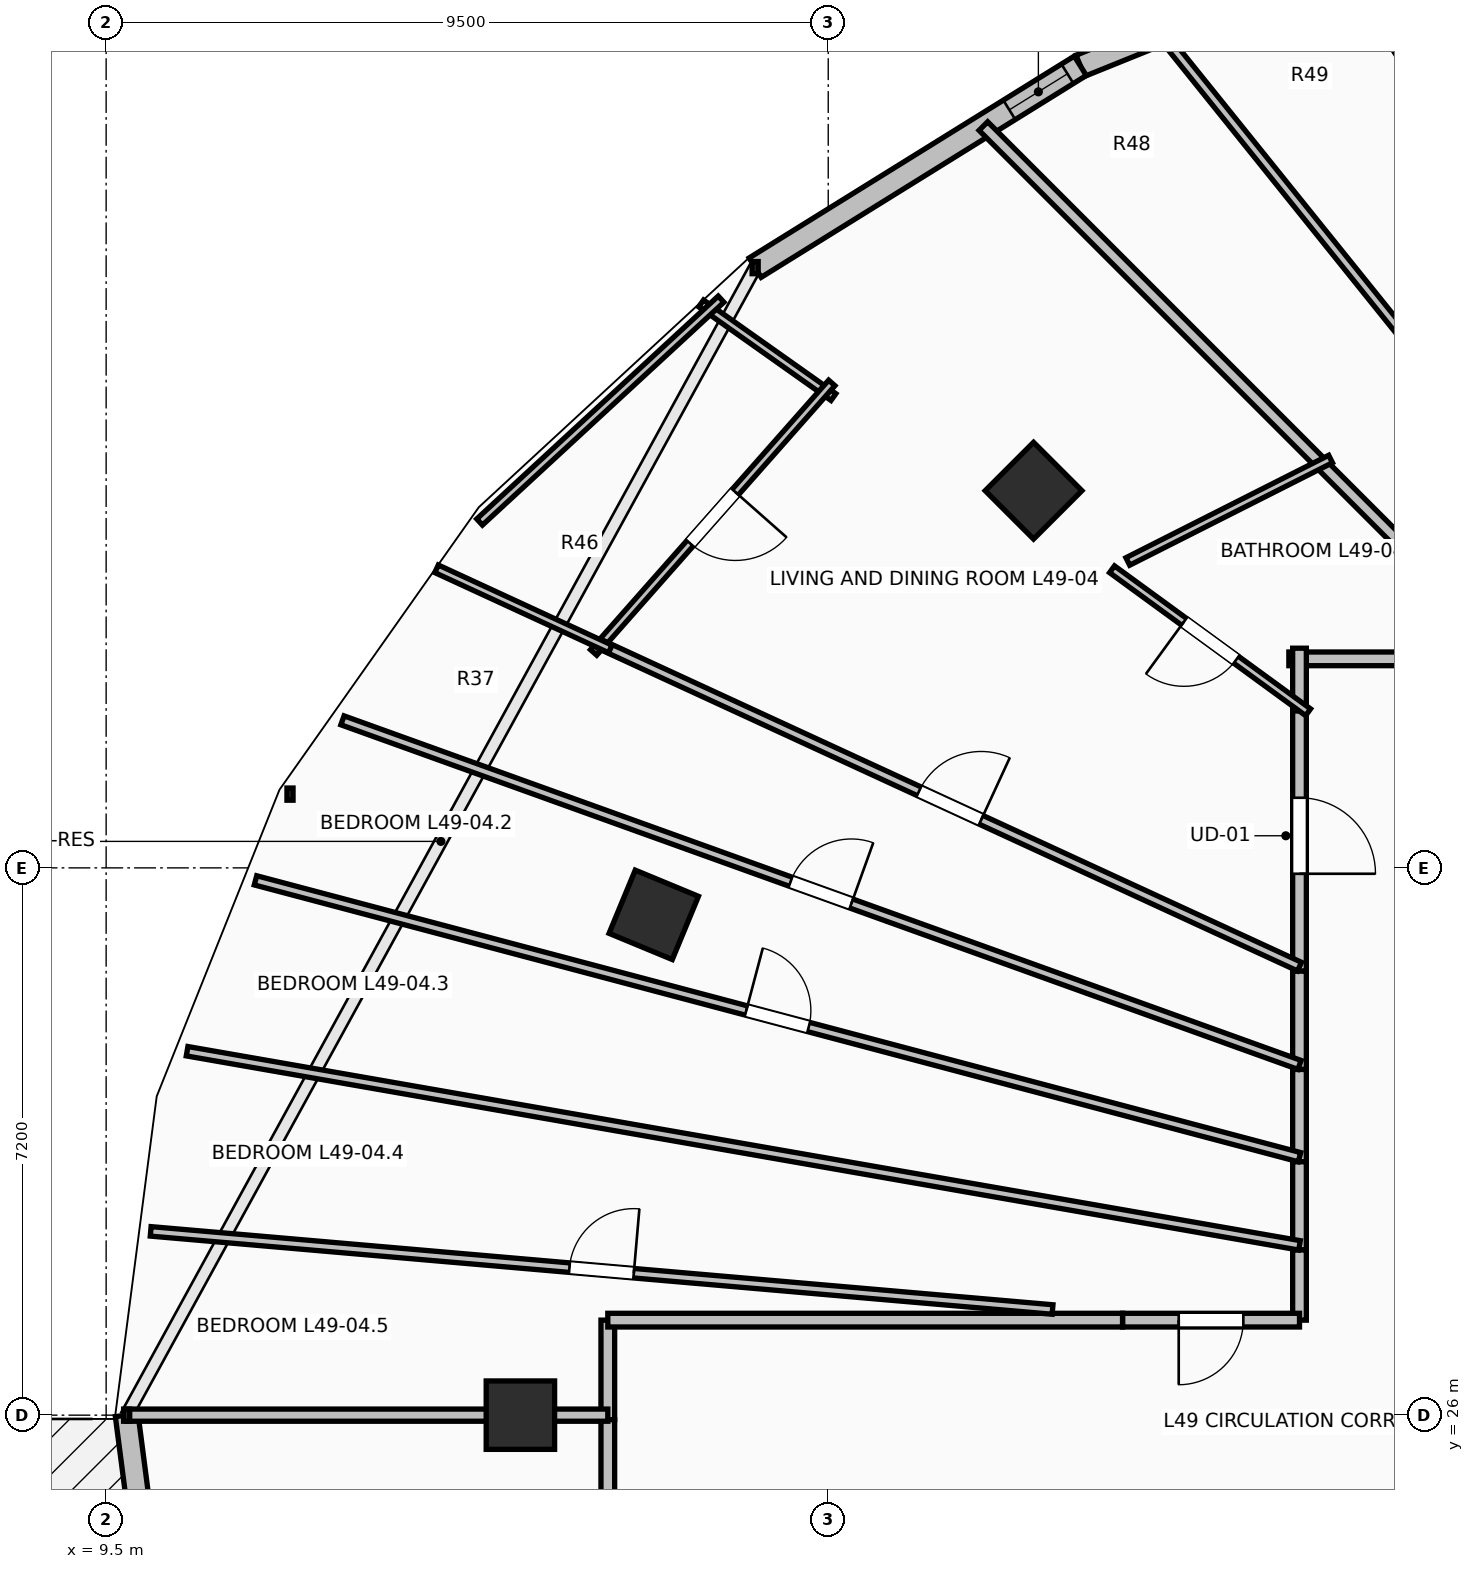
"""IFC4 building model, lengths in metres.
Left out: names, types, materials, properties, quantities, classifications, styles, units other than length and angle.
Written with IfcOpenShell. Run it as: python <this file> out.ifc"""

import sys

from ifc_helpers import new_model, si_unit, direction, frame, frame_2d, origin, origin_2d, place, context, subcontext, project, spatial, rectangle, extrude, element, fill, save


model = new_model("IFC4")
c1 = context("Model", 3, precision=1e-05, world=origin(), true_north=direction((0.0, 1.0)))
c2 = subcontext(c1, "Body", "Model", "MODEL_VIEW")
j1 = project(units=[si_unit("LENGTHUNIT", "METRE"), si_unit("PLANEANGLEUNIT", "RADIAN")], contexts=[c1])
p1 = place(None, origin())
s1 = spatial("IfcSite", under=j1, at=p1, CompositionType="ELEMENT")
p2 = place(p1, origin())
s2 = spatial("IfcBuilding", under=s1, at=p2, CompositionType="ELEMENT")
p3 = place(p2, frame((0.0, 0.0, 182.6)))
s3 = spatial("IfcBuildingStorey", under=s2, at=p3, CompositionType="ELEMENT", Elevation=182.6)
for number, where, z_axis, x_axis in (
    (1, (21.701, 38.162, 0.0), (0.0, 0.0, 1.0), (-0.707, 0.707, 0.0)),
    (2, (16.705, 32.582, 0.0), (0.0, 0.0, 1.0), (-0.924, 0.383, 0.0)),
    (3, (14.95, 26.0, 0.0), (0.0, 0.0, 1.0), (-1.0, 0.0, 0.0)),
):
    element("IfcColumn", number, at=place(p3, frame(where, z_axis=z_axis, x_axis=x_axis)), inside=s3, PredefinedType="COLUMN", context=c2, shape_type="SweptSolid", body=[
        extrude(rectangle(XDim=0.9, YDim=0.9, at=origin_2d()), origin(), (0.0, 0.0, 1.0), 3.5),
    ])
p4 = place(p3, frame((27.197, 45.725, 0.0), z_axis=(0.0, 0.0, 1.0), x_axis=(-0.927111094334, -0.374786630981, 0.0)))
e4 = element("IfcWall", 4, at=p4, inside=s3, PredefinedType="STANDARD", context=c2, shape_type="SweptSolid", body=[
    extrude(rectangle(XDim=5.264, YDim=0.3, at=frame_2d((2.632, 0.0))), origin(), (0.0, 0.0, 1.0), 3.24),
])
p5 = place(p4, frame((0.258, 0.0, 0.85)))
e5 = element("IfcOpeningElement", 5, at=p5, cuts=e4, PredefinedType="OPENING", context=c2, shape_type="SweptSolid", body=[
    extrude(rectangle(XDim=0.9, YDim=1.8, at=frame_2d((0.45, 0.9))), frame((0.0, 0.165, 0.0), z_axis=(0.0, -1.0, 0.0), x_axis=(1.0, 0.0, 0.0)), (0.0, 0.0, 1.0), 0.33),
])
p6 = place(p4, frame((2.032, 0.0, 0.85)))
e6 = element("IfcOpeningElement", 6, at=p6, cuts=e4, PredefinedType="OPENING", context=c2, shape_type="SweptSolid", body=[
    extrude(rectangle(XDim=1.2, YDim=1.95, at=frame_2d((0.6, 0.975))), frame((0.0, 0.165, 0.0), z_axis=(0.0, -1.0, 0.0), x_axis=(1.0, 0.0, 0.0)), (0.0, 0.0, 1.0), 0.33),
])
p7 = place(p3, frame((22.316, 43.752, 0.0), z_axis=(0.0, 0.0, 1.0), x_axis=(-0.849647657754, -0.527350791858, 0.0)))
e7 = element("IfcWall", 7, at=p7, inside=s3, PredefinedType="STANDARD", context=c2, shape_type="SweptSolid", body=[
    extrude(rectangle(XDim=5.035, YDim=0.3, at=frame_2d((2.518, 0.0))), origin(), (0.0, 0.0, 1.0), 3.24),
])
p8 = place(p7, frame((0.199, 0.0, 0.85)))
e8 = element("IfcOpeningElement", 8, at=p8, cuts=e7, PredefinedType="OPENING", context=c2, shape_type="SweptSolid", body=[
    extrude(rectangle(XDim=0.9, YDim=1.8, at=frame_2d((0.45, 0.9))), frame((0.0, 0.165, 0.0), z_axis=(0.0, -1.0, 0.0), x_axis=(1.0, 0.0, 0.0)), (0.0, 0.0, 1.0), 0.33),
])
p9 = place(p3, frame((9.77, 26.0, 0.0), z_axis=(0.0, 0.0, 1.0), x_axis=(0.129147853268, -0.991625348605, 0.0)))
e9 = element("IfcWall", 9, at=p9, inside=s3, PredefinedType="STANDARD", context=c2, shape_type="SweptSolid", body=[
    extrude(rectangle(XDim=4.2, YDim=0.3, at=frame_2d((2.1, 0.0))), origin(), (0.0, 0.0, 1.0), 3.24),
])
p10 = place(p9, frame((1.3, 0.0, 0.0)))
e10 = element("IfcOpeningElement", 10, at=p10, cuts=e9, PredefinedType="OPENING", context=c2, shape_type="SweptSolid", body=[
    extrude(rectangle(XDim=1.6, YDim=2.3, at=frame_2d((0.8, 1.15))), frame((0.0, 0.165, 0.0), z_axis=(0.0, -1.0, 0.0), x_axis=(1.0, 0.0, 0.0)), (0.0, 0.0, 1.0), 0.33),
])
p11 = place(p3, frame((25.2, 35.404, 0.0), z_axis=(0.0, 0.0, 1.0), x_axis=(0.0, -1.0, 0.0)))
e11 = element("IfcWall", 11, at=p11, inside=s3, PredefinedType="PARTITIONING", context=c2, shape_type="SweptSolid", body=[
    extrude(rectangle(XDim=3.563, YDim=0.18, at=frame_2d((1.781, 0.0))), origin(), (0.0, 0.0, 1.0), 2.432),
])
p12 = place(p11, frame((1.281, 0.0, 0.0)))
e12 = element("IfcOpeningElement", 12, at=p12, cuts=e11, PredefinedType="OPENING", context=c2, shape_type="SweptSolid", body=[
    extrude(rectangle(XDim=1.0, YDim=2.15, at=frame_2d((0.5, 1.075))), frame((0.0, 0.105, 0.0), z_axis=(0.0, -1.0, 0.0), x_axis=(1.0, 0.0, 0.0)), (0.0, 0.0, 1.0), 0.21),
])
p13 = place(p3, frame((28.105, 35.95, 0.0), z_axis=(0.0, 0.0, 1.0), x_axis=(-1.0, 0.0, 0.0)))
e13 = element("IfcWall", 13, at=p13, inside=s3, PredefinedType="PARTITIONING", context=c2, shape_type="SweptSolid", body=[
    extrude(rectangle(XDim=3.045, YDim=0.18, at=frame_2d((1.522, 0.0))), origin(), (0.0, 0.0, 1.0), 2.432),
])
p14 = place(p3, frame((25.2, 36.09, 0.0), z_axis=(0.0, 0.0, 1.0), x_axis=(0.0, -1.0, 0.0)))
e14 = element("IfcWall", 14, at=p14, inside=s3, PredefinedType="PARTITIONING", context=c2, shape_type="SweptSolid", body=[
    extrude(rectangle(XDim=0.826, YDim=0.18, at=frame_2d((0.413, 0.0))), origin(), (0.0, 0.0, 1.0), 2.432),
])
p15 = place(p3, frame((25.2, 31.841, 0.0), z_axis=(0.0, 0.0, 1.0), x_axis=(0.0, -1.0, 0.0)))
e15 = element("IfcWall", 15, at=p15, inside=s3, PredefinedType="PARTITIONING", context=c2, shape_type="SweptSolid", body=[
    extrude(rectangle(XDim=1.293, YDim=0.18, at=frame_2d((0.646, 0.0))), origin(), (0.0, 0.0, 1.0), 3.24),
])
p16 = place(p3, frame((25.2, 30.548, 0.0), z_axis=(0.0, 0.0, 1.0), x_axis=(0.0, -1.0, 0.0)))
e16 = element("IfcWall", 16, at=p16, inside=s3, PredefinedType="PARTITIONING", context=c2, shape_type="SweptSolid", body=[
    extrude(rectangle(XDim=1.214, YDim=0.18, at=frame_2d((0.607, 0.0))), origin(), (0.0, 0.0, 1.0), 2.432),
])
p17 = place(p3, frame((25.2, 29.334, 0.0), z_axis=(0.0, 0.0, 1.0), x_axis=(0.0, -1.0, 0.0)))
e17 = element("IfcWall", 17, at=p17, inside=s3, PredefinedType="PARTITIONING", context=c2, shape_type="SweptSolid", body=[
    extrude(rectangle(XDim=1.16, YDim=0.18, at=frame_2d((0.58, 0.0))), origin(), (0.0, 0.0, 1.0), 2.432),
])
p18 = place(p3, frame((25.2, 28.174, 0.0), z_axis=(0.0, 0.0, 1.0), x_axis=(0.0, -1.0, 0.0)))
e18 = element("IfcWall", 18, at=p18, inside=s3, PredefinedType="PARTITIONING", context=c2, shape_type="SweptSolid", body=[
    extrude(rectangle(XDim=0.924, YDim=0.18, at=frame_2d((0.462, 0.0))), origin(), (0.0, 0.0, 1.0), 2.432),
])
p19 = place(p3, frame((25.2, 27.25, 0.0), z_axis=(0.0, 0.0, 1.0), x_axis=(-1.0, 0.0, 0.0)))
e19 = element("IfcWall", 19, at=p19, inside=s3, PredefinedType="PARTITIONING", context=c2, shape_type="SweptSolid", body=[
    extrude(rectangle(XDim=2.328, YDim=0.18, at=frame_2d((1.164, 0.0))), origin(), (0.0, 0.0, 1.0), 2.432),
])
p20 = place(p19, frame((0.739, 0.0, 0.0)))
e20 = element("IfcOpeningElement", 20, at=p20, cuts=e19, PredefinedType="OPENING", context=c2, shape_type="SweptSolid", body=[
    extrude(rectangle(XDim=0.85, YDim=2.1, at=frame_2d((0.425, 1.05))), frame((0.0, 0.105, 0.0), z_axis=(0.0, -1.0, 0.0), x_axis=(1.0, 0.0, 0.0)), (0.0, 0.0, 1.0), 0.21),
])
p21 = place(p3, frame((16.1, 27.25, 0.0), z_axis=(0.0, 0.0, 1.0), x_axis=(0.0, -1.0, 0.0)))
e21 = element("IfcWall", 21, at=p21, inside=s3, PredefinedType="PARTITIONING", context=c2, shape_type="SweptSolid", body=[
    extrude(rectangle(XDim=1.31, YDim=0.18, at=frame_2d((0.655, 0.0))), origin(), (0.0, 0.0, 1.0), 2.432),
])
p22 = place(p3, frame((22.872, 27.25, 0.0), z_axis=(0.0, 0.0, 1.0), x_axis=(-1.0, 0.0, 0.0)))
e22 = element("IfcWall", 22, at=p22, inside=s3, PredefinedType="PARTITIONING", context=c2, shape_type="SweptSolid", body=[
    extrude(rectangle(XDim=6.772, YDim=0.18, at=frame_2d((3.386, 0.0))), origin(), (0.0, 0.0, 1.0), 2.432),
])
p23 = place(p3, frame((16.1, 25.94, 0.0), z_axis=(0.0, 0.0, 1.0), x_axis=(0.0, -1.0, 0.0)))
e23 = element("IfcWall", 23, at=p23, inside=s3, PredefinedType="PARTITIONING", context=c2, shape_type="SweptSolid", body=[
    extrude(rectangle(XDim=1.39, YDim=0.18, at=frame_2d((0.695, 0.0))), origin(), (0.0, 0.0, 1.0), 2.432),
])
p24 = place(p3, frame((25.749, 45.138, 0.0), z_axis=(0.0, 0.0, 1.0), x_axis=(0.539168632786, -0.842197830335, 0.0)))
e24 = element("IfcWall", 24, at=p24, inside=s3, PredefinedType="PARTITIONING", context=c2, shape_type="SweptSolid", body=[
    extrude(rectangle(XDim=10.909, YDim=0.125, at=frame_2d((5.455, 0.0))), origin(), (0.0, 0.0, 1.0), 2.432),
])
p25 = place(p3, frame((23.378, 44.178, 0.0), z_axis=(0.0, 0.0, 1.0), x_axis=(0.626756813732, -0.779214923137, 0.0)))
e25 = element("IfcWall", 25, at=p25, inside=s3, PredefinedType="PARTITIONING", context=c2, shape_type="SweptSolid", body=[
    extrude(rectangle(XDim=10.559, YDim=0.125, at=frame_2d((5.28, 0.0))), origin(), (0.0, 0.0, 1.0), 2.432),
])
p26 = place(p3, frame((21.041, 42.959, 0.0), z_axis=(0.0, 0.0, 1.0), x_axis=(0.707106781187, -0.707106781187, 0.0)))
e26 = element("IfcWall", 26, at=p26, inside=s3, PredefinedType="PARTITIONING", context=c2, shape_type="SweptSolid", body=[
    extrude(rectangle(XDim=9.912, YDim=0.16, at=frame_2d((4.956, 0.0))), origin(), (0.0, 0.0, 1.0), 2.432),
])
p27 = place(p3, frame((25.313, 35.248, 0.0), z_axis=(0.0, 0.0, 1.0), x_axis=(-0.807968083988, 0.58922625133, 0.0)))
e27 = element("IfcWall", 27, at=p27, inside=s3, PredefinedType="PARTITIONING", context=c2, shape_type="SweptSolid", body=[
    extrude(rectangle(XDim=3.192, YDim=0.11, at=frame_2d((1.596, 0.0))), origin(), (0.0, 0.0, 1.0), 2.432),
])
p28 = place(p27, frame((1.171, 0.0, 0.0)))
e28 = element("IfcOpeningElement", 28, at=p28, cuts=e27, PredefinedType="OPENING", context=c2, shape_type="SweptSolid", body=[
    extrude(rectangle(XDim=0.85, YDim=2.1, at=frame_2d((0.425, 1.05))), frame((0.0, 0.07, 0.0), z_axis=(0.0, -1.0, 0.0), x_axis=(1.0, 0.0, 0.0)), (0.0, 0.0, 1.0), 0.14),
])
p29 = place(p3, frame((22.941, 37.231, 0.0), z_axis=(0.0, 0.0, 1.0), x_axis=(0.892507731149, 0.451032094024, 0.0)))
e29 = element("IfcWall", 29, at=p29, inside=s3, PredefinedType="PARTITIONING", context=c2, shape_type="SweptSolid", body=[
    extrude(rectangle(XDim=2.989, YDim=0.11, at=frame_2d((1.495, 0.0))), origin(), (0.0, 0.0, 1.0), 2.432),
])
p30 = place(p3, frame((17.328, 40.626, 0.0), z_axis=(0.0, 0.0, 1.0), x_axis=(0.816262906602, -0.577680592807, 0.0)))
e30 = element("IfcWall", 30, at=p30, inside=s3, PredefinedType="PARTITIONING", context=c2, shape_type="SweptSolid", body=[
    extrude(rectangle(XDim=2.133, YDim=0.11, at=frame_2d((1.066, 0.0))), origin(), (0.0, 0.0, 1.0), 3.24),
])
p31 = place(p3, frame((19.047, 39.58, 0.0), z_axis=(0.0, 0.0, 1.0), x_axis=(-0.662189711464, -0.749336230294, 0.0)))
e31 = element("IfcWall", 31, at=p31, inside=s3, PredefinedType="PARTITIONING", context=c2, shape_type="SweptSolid", body=[
    extrude(rectangle(XDim=4.732, YDim=0.11, at=frame_2d((2.366, 0.0))), origin(), (0.0, 0.0, 1.0), 3.24),
])
p32 = place(p31, frame((1.916, 0.0, 0.0)))
e32 = element("IfcOpeningElement", 32, at=p32, cuts=e31, PredefinedType="OPENING", context=c2, shape_type="SweptSolid", body=[
    extrude(rectangle(XDim=0.9, YDim=2.1, at=frame_2d((0.45, 1.05))), frame((0.0, 0.07, 0.0), z_axis=(0.0, -1.0, 0.0), x_axis=(1.0, 0.0, 0.0)), (0.0, 0.0, 1.0), 0.14),
])
p33 = place(p3, frame((17.59, 40.682, 0.0), z_axis=(0.0, 0.0, 1.0), x_axis=(-0.734861902375, -0.678216768031, 0.0)))
e33 = element("IfcWall", 33, at=p33, inside=s3, PredefinedType="PARTITIONING", context=c2, shape_type="SweptSolid", body=[
    extrude(rectangle(XDim=4.323, YDim=0.11, at=frame_2d((2.162, 0.0))), origin(), (0.0, 0.0, 1.0), 3.24),
])
p34 = place(p3, frame((16.006, 36.139, 0.0), z_axis=(0.0, 0.0, 1.0), x_axis=(0.908157621609, -0.41862839645, 0.0)))
e34 = element("IfcWall", 34, at=p34, inside=s3, PredefinedType="PARTITIONING", context=c2, shape_type="SweptSolid", body=[
    extrude(rectangle(XDim=10.124, YDim=0.125, at=frame_2d((5.062, 0.0))), origin(), (0.0, 0.0, 1.0), 2.774),
])
p35 = place(p34, frame((4.612, 0.0, 0.0)))
e35 = element("IfcOpeningElement", 35, at=p35, cuts=e34, PredefinedType="OPENING", context=c2, shape_type="SweptSolid", body=[
    extrude(rectangle(XDim=0.9, YDim=2.1, at=frame_2d((0.45, 1.05))), frame((0.0, 0.077, 0.0), z_axis=(0.0, -1.0, 0.0), x_axis=(1.0, 0.0, 0.0)), (0.0, 0.0, 1.0), 0.155),
])
p36 = place(p3, frame((13.847, 37.135, 0.0), z_axis=(0.0, 0.0, 1.0), x_axis=(0.908101251341, -0.418750662462, 0.0)))
e36 = element("IfcWall", 36, at=p36, inside=s3, PredefinedType="PARTITIONING", context=c2, shape_type="SweptSolid", body=[
    extrude(rectangle(XDim=2.518, YDim=0.11, at=frame_2d((1.259, 0.0))), origin(), (0.0, 0.0, 1.0), 3.24),
])
p37 = place(p3, frame((12.609, 35.141, 0.0), z_axis=(0.0, 0.0, 1.0), x_axis=(0.940877411069, -0.338747246985, 0.0)))
e37 = element("IfcWall", 37, at=p37, inside=s3, PredefinedType="PARTITIONING", context=c2, shape_type="SweptSolid", body=[
    extrude(rectangle(XDim=13.382, YDim=0.125, at=frame_2d((6.691, 0.0))), origin(), (0.0, 0.0, 1.0), 2.774),
])
p38 = place(p37, frame((6.266, 0.0, 0.0)))
e38 = element("IfcOpeningElement", 38, at=p38, cuts=e37, PredefinedType="OPENING", context=c2, shape_type="SweptSolid", body=[
    extrude(rectangle(XDim=0.85, YDim=2.1, at=frame_2d((0.425, 1.05))), frame((0.0, 0.077, 0.0), z_axis=(0.0, -1.0, 0.0), x_axis=(1.0, 0.0, 0.0)), (0.0, 0.0, 1.0), 0.155),
])
p39 = place(p3, frame((11.465, 33.036, 0.0), z_axis=(0.0, 0.0, 1.0), x_axis=(0.966598137313, -0.256296782934, 0.0)))
e39 = element("IfcWall", 39, at=p39, inside=s3, PredefinedType="PARTITIONING", context=c2, shape_type="SweptSolid", body=[
    extrude(rectangle(XDim=14.209, YDim=0.125, at=frame_2d((7.105, 0.0))), origin(), (0.0, 0.0, 1.0), 2.432),
])
p40 = place(p39, frame((6.68, 0.0, 0.0)))
e40 = element("IfcOpeningElement", 40, at=p40, cuts=e39, PredefinedType="OPENING", context=c2, shape_type="SweptSolid", body=[
    extrude(rectangle(XDim=0.85, YDim=2.1, at=frame_2d((0.425, 1.05))), frame((0.0, 0.077, 0.0), z_axis=(0.0, -1.0, 0.0), x_axis=(1.0, 0.0, 0.0)), (0.0, 0.0, 1.0), 0.155),
])
p41 = place(p3, frame((10.565, 30.788, 0.0), z_axis=(0.0, 0.0, 1.0), x_axis=(0.985109541297, -0.171927867563, 0.0)))
e41 = element("IfcWall", 41, at=p41, inside=s3, PredefinedType="PARTITIONING", context=c2, shape_type="SweptSolid", body=[
    extrude(rectangle(XDim=14.856, YDim=0.125, at=frame_2d((7.428, 0.0))), origin(), (0.0, 0.0, 1.0), 2.774),
])
p42 = place(p3, frame((10.086, 28.418, 0.0), z_axis=(0.0, 0.0, 1.0), x_axis=(0.996267232338, -0.08632266081, 0.0)))
e42 = element("IfcWall", 42, at=p42, inside=s3, PredefinedType="PARTITIONING", context=c2, shape_type="SweptSolid", body=[
    extrude(rectangle(XDim=11.91, YDim=0.125, at=frame_2d((5.955, 0.0))), origin(), (0.0, 0.0, 1.0), 2.432),
])
p43 = place(p42, frame((5.53, 0.0, 0.0)))
e43 = element("IfcOpeningElement", 43, at=p43, cuts=e42, PredefinedType="OPENING", context=c2, shape_type="SweptSolid", body=[
    extrude(rectangle(XDim=0.85, YDim=2.1, at=frame_2d((0.425, 1.05))), frame((0.0, 0.077, 0.0), z_axis=(0.0, -1.0, 0.0), x_axis=(1.0, 0.0, 0.0)), (0.0, 0.0, 1.0), 0.155),
])
p44 = place(p3, frame((9.771, 26.0, 0.0), z_axis=(0.0, 0.0, 1.0), x_axis=(1.0, 0.0, 0.0)))
e44 = element("IfcWall", 44, at=p44, inside=s3, PredefinedType="PARTITIONING", context=c2, shape_type="SweptSolid", body=[
    extrude(rectangle(XDim=6.329, YDim=0.16, at=frame_2d((3.165, 0.0))), origin(), (0.0, 0.0, 1.0), 2.432),
])
p45 = place(p8, origin())
e45 = element("IfcWindow", 45, at=p45, inside=s3, PartitioningType="SINGLE_PANEL", PredefinedType="WINDOW", context=c2, shape_type="SweptSolid", body=[
    extrude(rectangle(XDim=0.9, YDim=1.8, at=frame_2d((0.45, 0.9))), frame((0.0, 0.03, 0.0), z_axis=(0.0, -1.0, 0.0), x_axis=(1.0, 0.0, 0.0)), (0.0, 0.0, 1.0), 0.06),
])
fill(e8, e45)
p46 = place(p12, origin())
e46 = element("IfcDoor", 46, at=p46, inside=s3, OperationType="SINGLE_SWING_RIGHT", PredefinedType="DOOR", context=c2, shape_type="SweptSolid", body=[
    extrude(rectangle(XDim=1.0, YDim=2.15, at=frame_2d((0.5, 1.075))), frame((0.0, 0.025, 0.0), z_axis=(0.0, -1.0, 0.0), x_axis=(1.0, 0.0, 0.0)), (0.0, 0.0, 1.0), 0.05),
])
fill(e12, e46)
p47 = place(p28, origin())
e47 = element("IfcDoor", 47, at=p47, inside=s3, OperationType="SINGLE_SWING_RIGHT", PredefinedType="DOOR", context=c2, shape_type="SweptSolid", body=[
    extrude(rectangle(XDim=0.85, YDim=2.1, at=frame_2d((0.425, 1.05))), frame((0.0, 0.025, 0.0), z_axis=(0.0, -1.0, 0.0), x_axis=(1.0, 0.0, 0.0)), (0.0, 0.0, 1.0), 0.05),
])
fill(e28, e47)
p48 = place(p32, origin())
e48 = element("IfcDoor", 48, at=p48, inside=s3, OperationType="SINGLE_SWING_LEFT", PredefinedType="DOOR", context=c2, shape_type="SweptSolid", body=[
    extrude(rectangle(XDim=0.9, YDim=2.1, at=frame_2d((0.45, 1.05))), frame((0.0, 0.025, 0.0), z_axis=(0.0, -1.0, 0.0), x_axis=(1.0, 0.0, 0.0)), (0.0, 0.0, 1.0), 0.05),
])
fill(e32, e48)
p49 = place(p35, origin())
e49 = element("IfcDoor", 49, at=p49, inside=s3, OperationType="SINGLE_SWING_RIGHT", PredefinedType="DOOR", context=c2, shape_type="SweptSolid", body=[
    extrude(rectangle(XDim=0.9, YDim=2.1, at=frame_2d((0.45, 1.05))), frame((0.0, 0.025, 0.0), z_axis=(0.0, -1.0, 0.0), x_axis=(1.0, 0.0, 0.0)), (0.0, 0.0, 1.0), 0.05),
])
fill(e35, e49)
p50 = place(p20, origin())
e50 = element("IfcDoor", 50, at=p50, inside=s3, OperationType="SINGLE_SWING_RIGHT", PredefinedType="DOOR", context=c2, shape_type="SweptSolid", body=[
    extrude(rectangle(XDim=0.85, YDim=2.1, at=frame_2d((0.425, 1.05))), frame((0.0, 0.025, 0.0), z_axis=(0.0, -1.0, 0.0), x_axis=(1.0, 0.0, 0.0)), (0.0, 0.0, 1.0), 0.05),
])
fill(e20, e50)
p51 = place(p38, origin())
e51 = element("IfcDoor", 51, at=p51, inside=s3, OperationType="SINGLE_SWING_RIGHT", PredefinedType="DOOR", context=c2, shape_type="SweptSolid", body=[
    extrude(rectangle(XDim=0.85, YDim=2.1, at=frame_2d((0.425, 1.05))), frame((0.0, 0.025, 0.0), z_axis=(0.0, -1.0, 0.0), x_axis=(1.0, 0.0, 0.0)), (0.0, 0.0, 1.0), 0.05),
])
fill(e38, e51)
p52 = place(p40, origin())
e52 = element("IfcDoor", 52, at=p52, inside=s3, OperationType="SINGLE_SWING_LEFT", PredefinedType="DOOR", context=c2, shape_type="SweptSolid", body=[
    extrude(rectangle(XDim=0.85, YDim=2.1, at=frame_2d((0.425, 1.05))), frame((0.0, 0.025, 0.0), z_axis=(0.0, -1.0, 0.0), x_axis=(1.0, 0.0, 0.0)), (0.0, 0.0, 1.0), 0.05),
])
fill(e40, e52)
p53 = place(p43, origin())
e53 = element("IfcDoor", 53, at=p53, inside=s3, OperationType="SINGLE_SWING_RIGHT", PredefinedType="DOOR", context=c2, shape_type="SweptSolid", body=[
    extrude(rectangle(XDim=0.85, YDim=2.1, at=frame_2d((0.425, 1.05))), frame((0.0, 0.025, 0.0), z_axis=(0.0, -1.0, 0.0), x_axis=(1.0, 0.0, 0.0)), (0.0, 0.0, 1.0), 0.05),
])
fill(e43, e53)
save(model, sys.argv[1])
